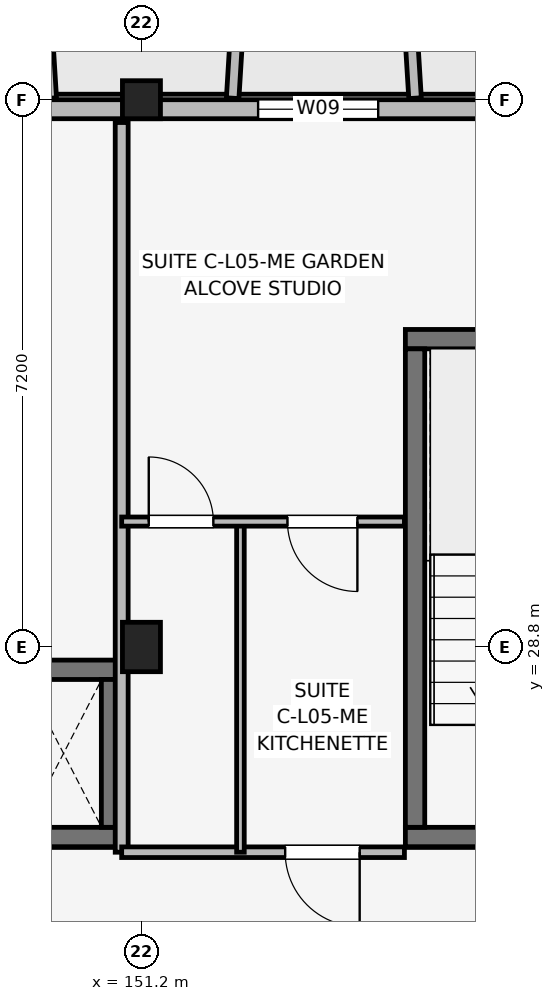
"""IFC4 building model, lengths in metres.
Left out: names, types, materials, properties, quantities, classifications, styles, units other than length and angle.
Written with IfcOpenShell. Run it as: python <this file> out.ifc"""

import sys

from ifc_helpers import new_model, si_unit, direction, frame, frame_2d, origin, origin_2d, place, context, subcontext, project, spatial, rectangle, extrude, element, fill, save


model = new_model("IFC4")
c1 = context("Model", 3, precision=1e-05, world=origin(), true_north=direction((0.0, 1.0)))
c2 = subcontext(c1, "Body", "Model", "MODEL_VIEW")
j1 = project(units=[si_unit("LENGTHUNIT", "METRE"), si_unit("PLANEANGLEUNIT", "RADIAN")], contexts=[c1])
p1 = place(None, origin())
s1 = spatial("IfcSite", under=j1, at=p1, CompositionType="ELEMENT")
p2 = place(p1, origin())
s2 = spatial("IfcBuilding", under=s1, at=p2, CompositionType="ELEMENT")
p3 = place(p2, frame((0.0, 0.0, 18.15)))
s3 = spatial("IfcBuildingStorey", under=s2, at=p3, CompositionType="ELEMENT", Elevation=18.15)
p4 = place(p3, frame((151.2, 28.8, 0.0), z_axis=(0.0, 0.0, 1.0), x_axis=(1.0, 0.0, 0.0)))
e1 = element("IfcColumn", 1, at=p4, inside=s3, PredefinedType="COLUMN", context=c2, shape_type="SweptSolid", body=[
    extrude(rectangle(XDim=0.5, YDim=0.65, at=origin_2d()), origin(), (0.0, 0.0, 1.0), 3.15),
])
p5 = place(p3, frame((151.2, 36.0, 0.0), z_axis=(0.0, 0.0, 1.0), x_axis=(1.0, 0.0, 0.0)))
e2 = element("IfcColumn", 2, at=p5, inside=s3, PredefinedType="COLUMN", context=c2, shape_type="SweptSolid", body=[
    extrude(rectangle(XDim=0.5, YDim=0.5, at=origin_2d()), origin(), (0.0, 0.0, 1.0), 3.15),
])
p6 = place(p3, frame((154.673, 26.3, 0.0), z_axis=(0.0, 0.0, 1.0), x_axis=(1.0, 0.0, 0.0)))
e3 = element("IfcWall", 3, at=p6, inside=s3, PredefinedType="SHEAR", context=c2, shape_type="SweptSolid", body=[
    extrude(rectangle(XDim=3.305, YDim=0.255, at=frame_2d((1.652, 0.0))), origin(), (0.0, 0.0, 1.0), 3.15),
])
p7 = place(p6, frame((1.127, 0.0, 0.0)))
e4 = element("IfcOpeningElement", 4, at=p7, cuts=e3, PredefinedType="OPENING", context=c2, shape_type="SweptSolid", body=[
    extrude(rectangle(XDim=1.05, YDim=2.12, at=frame_2d((0.525, 1.06))), frame((0.0, 0.137, 0.0), z_axis=(0.0, -1.0, 0.0), x_axis=(1.0, 0.0, 0.0)), (0.0, 0.0, 1.0), 0.275),
])
p8 = place(p3, frame((154.673, 32.85, 0.0), z_axis=(0.0, 0.0, 1.0), x_axis=(1.0, 0.0, 0.0)))
e5 = element("IfcWall", 5, at=p8, inside=s3, PredefinedType="SHEAR", context=c2, shape_type="SweptSolid", body=[
    extrude(rectangle(XDim=3.305, YDim=0.255, at=frame_2d((1.652, 0.0))), origin(), (0.0, 0.0, 1.0), 3.15),
])
p9 = place(p3, frame((154.8, 26.427, 0.0), z_axis=(0.0, 0.0, 1.0), x_axis=(0.0, 1.0, 0.0)))
e6 = element("IfcWall", 6, at=p9, inside=s3, PredefinedType="SHEAR", context=c2, shape_type="SweptSolid", body=[
    extrude(rectangle(XDim=6.295, YDim=0.255, at=frame_2d((3.147, 0.0))), origin(), (0.0, 0.0, 1.0), 3.15),
])
for number, where, z_axis, x_axis in (
    (7, (149.123, 26.3, 0.0), (0.0, 0.0, 1.0), (1.0, 0.0, 0.0)),
    (8, (149.123, 28.5, 0.0), (0.0, 0.0, 1.0), (1.0, 0.0, 0.0)),
):
    element("IfcWall", number, at=place(p3, frame(where, z_axis=z_axis, x_axis=x_axis)), inside=s3, PredefinedType="SHEAR", context=c2, shape_type="SweptSolid", body=[
        extrude(rectangle(XDim=1.805, YDim=0.255, at=frame_2d((0.902, 0.0))), origin(), (0.0, 0.0, 1.0), 3.15),
    ])
p10 = place(p3, frame((150.8, 26.427, 0.0), z_axis=(0.0, 0.0, 1.0), x_axis=(0.0, 1.0, 0.0)))
e9 = element("IfcWall", 9, at=p10, inside=s3, PredefinedType="SHEAR", context=c2, shape_type="SweptSolid", body=[
    extrude(rectangle(XDim=1.945, YDim=0.255, at=frame_2d((0.973, 0.0))), origin(), (0.0, 0.0, 1.0), 3.15),
])
p11 = place(p3, frame((162.6, 35.875, 0.0), z_axis=(0.0, 0.0, 1.0), x_axis=(-1.0, 0.0, 0.0)))
e10 = element("IfcWall", 10, at=p11, inside=s3, PredefinedType="SOLIDWALL", context=c2, shape_type="SweptSolid", body=[
    extrude(rectangle(XDim=30.0, YDim=0.25, at=frame_2d((15.0, 0.0))), origin(), (0.0, 0.0, 1.0), 2.43),
])
p12 = place(p11, frame((28.95, 0.0, 0.0), z_axis=(0.0, 0.0, 1.0), x_axis=(-1.0, 0.0, 0.0)))
e11 = element("IfcOpeningElement", 11, at=p12, cuts=e10, PredefinedType="OPENING", context=c2, shape_type="SweptSolid", body=[
    extrude(rectangle(XDim=1.5, YDim=2.15, at=frame_2d((0.75, 1.075))), frame((0.0, 0.135, 0.0), z_axis=(0.0, -1.0, 0.0), x_axis=(1.0, 0.0, 0.0)), (0.0, 0.0, 1.0), 0.27),
])
p13 = place(p11, frame((2.625, 0.0, 0.0), z_axis=(0.0, 0.0, 1.0), x_axis=(-1.0, 0.0, 0.0)))
e12 = element("IfcOpeningElement", 12, at=p13, cuts=e10, PredefinedType="OPENING", context=c2, shape_type="SweptSolid", body=[
    extrude(rectangle(XDim=1.65, YDim=2.15, at=frame_2d((0.825, 1.075))), frame((0.0, 0.135, 0.0), z_axis=(0.0, -1.0, 0.0), x_axis=(1.0, 0.0, 0.0)), (0.0, 0.0, 1.0), 0.27),
])
p14 = place(p11, frame((15.23, 0.0, 0.5)))
e13 = element("IfcOpeningElement", 13, at=p14, cuts=e10, PredefinedType="OPENING", context=c2, shape_type="SweptSolid", body=[
    extrude(rectangle(XDim=1.15, YDim=1.68, at=frame_2d((0.575, 0.84))), frame((0.0, 0.135, 0.0), z_axis=(0.0, -1.0, 0.0), x_axis=(1.0, 0.0, 0.0)), (0.0, 0.0, 1.0), 0.27),
])
p15 = place(p11, frame((8.285, 0.0, 0.7)))
e14 = element("IfcOpeningElement", 14, at=p15, cuts=e10, PredefinedType="OPENING", context=c2, shape_type="SweptSolid", body=[
    extrude(rectangle(XDim=1.58, YDim=1.6, at=frame_2d((0.79, 0.8))), frame((0.0, 0.135, 0.0), z_axis=(0.0, -1.0, 0.0), x_axis=(1.0, 0.0, 0.0)), (0.0, 0.0, 1.0), 0.27),
])
p16 = place(p11, frame((20.04, 0.0, 0.7)))
e15 = element("IfcOpeningElement", 15, at=p16, cuts=e10, PredefinedType="OPENING", context=c2, shape_type="SweptSolid", body=[
    extrude(rectangle(XDim=1.72, YDim=1.6, at=frame_2d((0.86, 0.8))), frame((0.0, 0.135, 0.0), z_axis=(0.0, -1.0, 0.0), x_axis=(1.0, 0.0, 0.0)), (0.0, 0.0, 1.0), 0.27),
])
p17 = place(p3, frame((150.0, 36.02, 0.0), z_axis=(0.0, 0.0, 1.0), x_axis=(-0.061170732449, 0.998127317276, 0.0)))
e16 = element("IfcWall", 16, at=p17, inside=s3, PredefinedType="ELEMENTEDWALL", context=c2, shape_type="SweptSolid", body=[
    extrude(rectangle(XDim=1.964, YDim=0.165, at=frame_2d((0.982, 0.0))), origin(), (0.0, 0.0, 1.0), 2.45),
])
for number, where, z_axis, x_axis in (
    (17, (152.4, 36.02, 0.0), (0.0, 0.0, 1.0), (0.061, 0.998, 0.0)),
    (18, (154.8, 36.02, 0.0), (0.0, 0.0, 1.0), (-0.061, 0.998, 0.0)),
):
    element("IfcWall", number, at=place(p3, frame(where, z_axis=z_axis, x_axis=x_axis)), inside=s3, PredefinedType="ELEMENTEDWALL", context=c2, shape_type="SweptSolid", body=[
        extrude(rectangle(XDim=1.964, YDim=0.165, at=frame_2d((0.982, 0.0))), origin(), (0.0, 0.0, 1.0), 2.53),
    ])
p18 = place(p3, frame((150.94, 26.1, 0.0), z_axis=(0.0, 0.0, 1.0), x_axis=(0.0, 1.0, 0.0)))
e19 = element("IfcWall", 19, at=p18, inside=s3, PredefinedType="PARTITIONING", context=c2, shape_type="SweptSolid", body=[
    extrude(rectangle(XDim=9.6, YDim=0.17, at=frame_2d((4.8, 0.0))), origin(), (0.0, 0.0, 1.0), 2.38),
])
p19 = place(p3, frame((150.94, 26.1, 0.0), z_axis=(0.0, 0.0, 1.0), x_axis=(1.0, 0.0, 0.0)))
e20 = element("IfcWall", 20, at=p19, inside=s3, PredefinedType="PARTITIONING", context=c2, shape_type="SweptSolid", body=[
    extrude(rectangle(XDim=3.72, YDim=0.14, at=frame_2d((1.86, 0.0))), origin(), (0.0, 0.0, 1.0), 2.38),
])
p20 = place(p19, frame((3.131, 0.0, 0.0), z_axis=(0.0, 0.0, 1.0), x_axis=(-1.0, 0.0, 0.0)))
e21 = element("IfcOpeningElement", 21, at=p20, cuts=e20, PredefinedType="OPENING", context=c2, shape_type="SweptSolid", body=[
    extrude(rectangle(XDim=0.98, YDim=2.1, at=frame_2d((0.49, 1.05))), frame((0.0, 0.08, 0.0), z_axis=(0.0, -1.0, 0.0), x_axis=(1.0, 0.0, 0.0)), (0.0, 0.0, 1.0), 0.16),
])
p21 = place(p3, frame((152.502, 26.1, 0.0), z_axis=(0.0, 0.0, 1.0), x_axis=(0.0, 1.0, 0.0)))
e22 = element("IfcWall", 22, at=p21, inside=s3, PredefinedType="PARTITIONING", context=c2, shape_type="SweptSolid", body=[
    extrude(rectangle(XDim=4.35, YDim=0.1, at=frame_2d((2.175, 0.0))), origin(), (0.0, 0.0, 1.0), 2.375),
])
p22 = place(p3, frame((150.94, 30.45, 0.0), z_axis=(0.0, 0.0, 1.0), x_axis=(1.0, 0.0, 0.0)))
e23 = element("IfcWall", 23, at=p22, inside=s3, PredefinedType="PARTITIONING", context=c2, shape_type="SweptSolid", body=[
    extrude(rectangle(XDim=3.72, YDim=0.12, at=frame_2d((1.86, 0.0))), origin(), (0.0, 0.0, 1.0), 2.38),
])
p23 = place(p22, frame((0.356, 0.0, 0.0)))
e24 = element("IfcOpeningElement", 24, at=p23, cuts=e23, PredefinedType="OPENING", context=c2, shape_type="SweptSolid", body=[
    extrude(rectangle(XDim=0.85, YDim=2.08, at=frame_2d((0.425, 1.04))), frame((0.0, 0.07, 0.0), z_axis=(0.0, -1.0, 0.0), x_axis=(1.0, 0.0, 0.0)), (0.0, 0.0, 1.0), 0.14),
])
p24 = place(p22, frame((3.101, 0.0, 0.0), z_axis=(0.0, 0.0, 1.0), x_axis=(-1.0, 0.0, 0.0)))
e25 = element("IfcOpeningElement", 25, at=p24, cuts=e23, PredefinedType="OPENING", context=c2, shape_type="SweptSolid", body=[
    extrude(rectangle(XDim=0.92, YDim=2.08, at=frame_2d((0.46, 1.04))), frame((0.0, 0.07, 0.0), z_axis=(0.0, -1.0, 0.0), x_axis=(1.0, 0.0, 0.0)), (0.0, 0.0, 1.0), 0.14),
])
p25 = place(p15, origin())
e26 = element("IfcWindow", 26, at=p25, inside=s3, PartitioningType="SINGLE_PANEL", PredefinedType="WINDOW", context=c2, shape_type="SweptSolid", body=[
    extrude(rectangle(XDim=1.58, YDim=1.6, at=frame_2d((0.79, 0.8))), frame((0.0, 0.03, 0.0), z_axis=(0.0, -1.0, 0.0), x_axis=(1.0, 0.0, 0.0)), (0.0, 0.0, 1.0), 0.06),
])
fill(e14, e26)
p26 = place(p20, origin())
e27 = element("IfcDoor", 27, at=p26, inside=s3, OperationType="SINGLE_SWING_RIGHT", PredefinedType="DOOR", context=c2, shape_type="SweptSolid", body=[
    extrude(rectangle(XDim=0.98, YDim=2.1, at=frame_2d((0.49, 1.05))), frame((0.0, 0.025, 0.0), z_axis=(0.0, -1.0, 0.0), x_axis=(1.0, 0.0, 0.0)), (0.0, 0.0, 1.0), 0.05),
])
fill(e21, e27)
p27 = place(p23, origin())
e28 = element("IfcDoor", 28, at=p27, inside=s3, OperationType="SINGLE_SWING_LEFT", PredefinedType="DOOR", context=c2, shape_type="SweptSolid", body=[
    extrude(rectangle(XDim=0.85, YDim=2.08, at=frame_2d((0.425, 1.04))), frame((0.0, 0.025, 0.0), z_axis=(0.0, -1.0, 0.0), x_axis=(1.0, 0.0, 0.0)), (0.0, 0.0, 1.0), 0.05),
])
fill(e24, e28)
p28 = place(p24, origin())
e29 = element("IfcDoor", 29, at=p28, inside=s3, OperationType="SINGLE_SWING_RIGHT", PredefinedType="DOOR", context=c2, shape_type="SweptSolid", body=[
    extrude(rectangle(XDim=0.92, YDim=2.08, at=frame_2d((0.46, 1.04))), frame((0.0, 0.025, 0.0), z_axis=(0.0, -1.0, 0.0), x_axis=(1.0, 0.0, 0.0)), (0.0, 0.0, 1.0), 0.05),
])
fill(e25, e29)
save(model, sys.argv[1])
